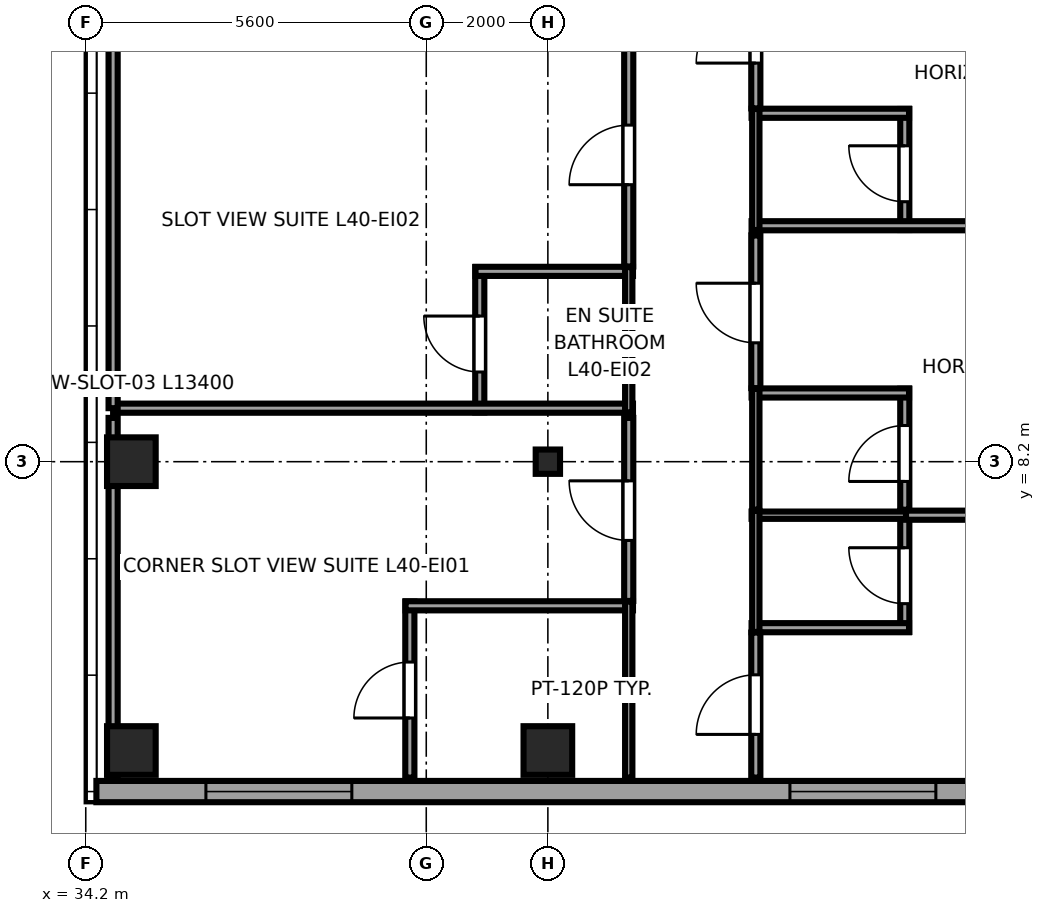
"""IFC4 building model, lengths in metres.
Left out: names, types, materials, properties, quantities, classifications, styles, units other than length and angle.
Written with IfcOpenShell. Run it as: python <this file> out.ifc"""

import sys

from ifc_helpers import new_model, si_unit, direction, frame, frame_2d, origin, origin_2d, place, context, subcontext, project, spatial, rectangle, i_section, extrude, source, transform, mapped, element, fill, save


model = new_model("IFC4")
c1 = context("Model", 3, precision=1e-05, world=origin(), true_north=direction((0.0, 1.0)))
c2 = subcontext(c1, "Body", "Model", "MODEL_VIEW")
j1 = project(units=[si_unit("LENGTHUNIT", "METRE"), si_unit("PLANEANGLEUNIT", "RADIAN")], contexts=[c1])
p1 = place(None, origin())
s1 = spatial("IfcSite", under=j1, at=p1, CompositionType="ELEMENT")
p2 = place(p1, origin())
s2 = spatial("IfcBuilding", under=s1, at=p2, CompositionType="ELEMENT")
p3 = place(p2, frame((0.0, 0.0, 154.15)))
s3 = spatial("IfcBuildingStorey", under=s2, at=p3, CompositionType="ELEMENT", Elevation=154.15)
m1 = source(origin(), c2, "Body", "SweptSolid", [
    extrude(rectangle(XDim=0.8, YDim=0.8, at=origin_2d()), origin(), (0.0, 0.0, 1.0), 3.55),
])
for number, where, z_axis, x_axis in (
    (1, (34.95, 3.45, 0.0), (0.0, 0.0, 1.0), (1.0, 0.0, 0.0)),
    (2, (34.95, 8.2, 0.0), (0.0, 0.0, 1.0), (1.0, 0.0, 0.0)),
    (3, (41.8, 3.45, 0.0), (0.0, 0.0, 1.0), (1.0, 0.0, 0.0)),
):
    element("IfcColumn", number, at=place(p3, frame(where, z_axis=z_axis, x_axis=x_axis)), inside=s3, PredefinedType="COLUMN", context=c2, shape_type="MappedRepresentation", body=[
        mapped(m1, transform((0.0, 0.0, 0.0), x_axis=(1.0, 0.0, 0.0), y_axis=(0.0, 1.0, 0.0), z_axis=(0.0, 0.0, 1.0), scale=1.0)),
    ])
m2 = source(origin(), c2, "Body", "SweptSolid", [
    extrude(i_section(OverallWidth=0.4, OverallDepth=0.4, WebThickness=0.02, FlangeThickness=0.035, at=origin_2d()), origin(), (0.0, 0.0, 1.0), 3.55),
])
p4 = place(p3, frame((41.8, 8.2, 0.0), z_axis=(0.0, 0.0, 1.0), x_axis=(1.0, 0.0, 0.0)))
e4 = element("IfcColumn", 4, at=p4, inside=s3, PredefinedType="COLUMN", context=c2, shape_type="MappedRepresentation", body=[
    mapped(m2, transform((0.0, 0.0, 0.0), x_axis=(1.0, 0.0, 0.0), y_axis=(0.0, 1.0, 0.0), z_axis=(0.0, 0.0, 1.0), scale=1.0)),
])
p5 = place(p3, frame((34.375, 2.775, 0.0), z_axis=(0.0, 0.0, 1.0), x_axis=(1.0, 0.0, 0.0)))
e5 = element("IfcWall", 5, at=p5, inside=s3, PredefinedType="SOLIDWALL", context=c2, shape_type="SweptSolid", body=[
    extrude(rectangle(XDim=15.608, YDim=0.35, at=frame_2d((7.804, 0.0))), origin(), (0.0, 0.0, 1.0), 3.37),
])
p6 = place(p5, frame((1.801, 0.0, 0.68)))
e6 = element("IfcOpeningElement", 6, at=p6, cuts=e5, PredefinedType="OPENING", context=c2, shape_type="SweptSolid", body=[
    extrude(rectangle(XDim=2.4, YDim=1.9, at=frame_2d((1.2, 0.95))), frame((0.0, 0.185, 0.0), z_axis=(0.0, -1.0, 0.0), x_axis=(1.0, 0.0, 0.0)), (0.0, 0.0, 1.0), 0.37),
])
p7 = place(p5, frame((11.406, 0.0, 0.68)))
e7 = element("IfcOpeningElement", 7, at=p7, cuts=e5, PredefinedType="OPENING", context=c2, shape_type="SweptSolid", body=[
    extrude(rectangle(XDim=2.4, YDim=1.9, at=frame_2d((1.2, 0.95))), frame((0.0, 0.185, 0.0), z_axis=(0.0, -1.0, 0.0), x_axis=(1.0, 0.0, 0.0)), (0.0, 0.0, 1.0), 0.37),
])
p8 = place(p3, frame((39.53, 3.005, 0.0), z_axis=(0.0, 0.0, 1.0), x_axis=(0.0, 1.0, 0.0)))
e8 = element("IfcWall", 8, at=p8, inside=s3, PredefinedType="PARTITIONING", context=c2, shape_type="SweptSolid", body=[
    extrude(rectangle(XDim=2.895, YDim=0.15, at=frame_2d((1.448, 0.0))), origin(), (0.0, 0.0, 1.0), 3.37),
])
p9 = place(p8, frame((0.98, 0.0, 0.0)))
e9 = element("IfcOpeningElement", 9, at=p9, cuts=e8, PredefinedType="OPENING", context=c2, shape_type="SweptSolid", body=[
    extrude(rectangle(XDim=0.92, YDim=2.01, at=frame_2d((0.46, 1.005))), frame((0.0, 0.085, 0.0), z_axis=(0.0, -1.0, 0.0), x_axis=(1.0, 0.0, 0.0)), (0.0, 0.0, 1.0), 0.17),
])
p10 = place(p3, frame((39.46, 5.83, 0.0), z_axis=(0.0, 0.0, 1.0), x_axis=(1.0, 0.0, 0.0)))
e10 = element("IfcWall", 10, at=p10, inside=s3, PredefinedType="PARTITIONING", context=c2, shape_type="SweptSolid", body=[
    extrude(rectangle(XDim=3.74, YDim=0.15, at=frame_2d((1.87, 0.0))), origin(), (0.0, 0.0, 1.0), 3.37),
])
p11 = place(p3, frame((43.13, 3.005, 0.0), z_axis=(0.0, 0.0, 1.0), x_axis=(0.0, 1.0, 0.0)))
e11 = element("IfcWall", 11, at=p11, inside=s3, PredefinedType="PLUMBINGWALL", context=c2, shape_type="SweptSolid", body=[
    extrude(rectangle(XDim=2.895, YDim=0.12, at=frame_2d((1.448, 0.0))), origin(), (0.0, 0.0, 1.0), 3.37),
])
p12 = place(p3, frame((40.68, 9.01, 0.0), z_axis=(0.0, 0.0, 1.0), x_axis=(0.0, 1.0, 0.0)))
e12 = element("IfcWall", 12, at=p12, inside=s3, PredefinedType="PARTITIONING", context=c2, shape_type="SweptSolid", body=[
    extrude(rectangle(XDim=2.39, YDim=0.15, at=frame_2d((1.195, 0.0))), origin(), (0.0, 0.0, 1.0), 3.37),
])
p13 = place(p12, frame((0.665, 0.0, 0.0)))
e13 = element("IfcOpeningElement", 13, at=p13, cuts=e12, PredefinedType="OPENING", context=c2, shape_type="SweptSolid", body=[
    extrude(rectangle(XDim=0.92, YDim=2.01, at=frame_2d((0.46, 1.005))), frame((0.0, 0.085, 0.0), z_axis=(0.0, -1.0, 0.0), x_axis=(1.0, 0.0, 0.0)), (0.0, 0.0, 1.0), 0.17),
])
p14 = place(p3, frame((34.65, 9.08, 0.0), z_axis=(0.0, 0.0, 1.0), x_axis=(1.0, 0.0, 0.0)))
e14 = element("IfcWall", 14, at=p14, inside=s3, PredefinedType="PARTITIONING", context=c2, shape_type="SweptSolid", body=[
    extrude(rectangle(XDim=8.55, YDim=0.15, at=frame_2d((4.275, 0.0))), origin(), (0.0, 0.0, 1.0), 3.37),
])
p15 = place(p3, frame((40.61, 11.33, 0.0), z_axis=(0.0, 0.0, 1.0), x_axis=(1.0, 0.0, 0.0)))
e15 = element("IfcWall", 15, at=p15, inside=s3, PredefinedType="PARTITIONING", context=c2, shape_type="SweptSolid", body=[
    extrude(rectangle(XDim=2.59, YDim=0.15, at=frame_2d((1.295, 0.0))), origin(), (0.0, 0.0, 1.0), 3.37),
])
p16 = place(p3, frame((43.13, 9.01, 0.0), z_axis=(0.0, 0.0, 1.0), x_axis=(0.0, 1.0, 0.0)))
e16 = element("IfcWall", 16, at=p16, inside=s3, PredefinedType="PLUMBINGWALL", context=c2, shape_type="SweptSolid", body=[
    extrude(rectangle(XDim=2.39, YDim=0.12, at=frame_2d((1.195, 0.0))), origin(), (0.0, 0.0, 1.0), 3.37),
])
p17 = place(p3, frame((47.67, 5.4, 0.0), z_axis=(0.0, 0.0, 1.0), x_axis=(0.0, 1.0, 0.0)))
e17 = element("IfcWall", 17, at=p17, inside=s3, PredefinedType="PARTITIONING", context=c2, shape_type="SweptSolid", body=[
    extrude(rectangle(XDim=1.99, YDim=0.15, at=frame_2d((0.995, 0.0))), origin(), (0.0, 0.0, 1.0), 3.37),
])
p18 = place(p17, frame((0.465, 0.0, 0.0)))
e18 = element("IfcOpeningElement", 18, at=p18, cuts=e17, PredefinedType="OPENING", context=c2, shape_type="SweptSolid", body=[
    extrude(rectangle(XDim=0.92, YDim=2.01, at=frame_2d((0.46, 1.005))), frame((0.0, 0.085, 0.0), z_axis=(0.0, -1.0, 0.0), x_axis=(1.0, 0.0, 0.0)), (0.0, 0.0, 1.0), 0.17),
])
p19 = place(p3, frame((45.15, 5.47, 0.0), z_axis=(0.0, 0.0, 1.0), x_axis=(1.0, 0.0, 0.0)))
e19 = element("IfcWall", 19, at=p19, inside=s3, PredefinedType="PARTITIONING", context=c2, shape_type="SweptSolid", body=[
    extrude(rectangle(XDim=2.59, YDim=0.15, at=frame_2d((1.295, 0.0))), origin(), (0.0, 0.0, 1.0), 3.37),
])
p20 = place(p3, frame((45.15, 7.32, 0.0), z_axis=(0.0, 0.0, 1.0), x_axis=(1.0, 0.0, 0.0)))
e20 = element("IfcWall", 20, at=p20, inside=s3, PredefinedType="PLUMBINGWALL", context=c2, shape_type="SweptSolid", body=[
    extrude(rectangle(XDim=2.59, YDim=0.12, at=frame_2d((1.295, 0.0))), origin(), (0.0, 0.0, 1.0), 3.37),
])
p21 = place(p3, frame((45.22, 5.4, 0.0), z_axis=(0.0, 0.0, 1.0), x_axis=(0.0, 1.0, 0.0)))
e21 = element("IfcWall", 21, at=p21, inside=s3, PredefinedType="PLUMBINGWALL", context=c2, shape_type="SweptSolid", body=[
    extrude(rectangle(XDim=1.99, YDim=0.12, at=frame_2d((0.995, 0.0))), origin(), (0.0, 0.0, 1.0), 3.37),
])
p22 = place(p3, frame((47.67, 7.41, 0.0), z_axis=(0.0, 0.0, 1.0), x_axis=(0.0, 1.0, 0.0)))
e22 = element("IfcWall", 22, at=p22, inside=s3, PredefinedType="PARTITIONING", context=c2, shape_type="SweptSolid", body=[
    extrude(rectangle(XDim=1.99, YDim=0.15, at=frame_2d((0.995, 0.0))), origin(), (0.0, 0.0, 1.0), 3.37),
])
p23 = place(p22, frame((0.465, 0.0, 0.0)))
e23 = element("IfcOpeningElement", 23, at=p23, cuts=e22, PredefinedType="OPENING", context=c2, shape_type="SweptSolid", body=[
    extrude(rectangle(XDim=0.92, YDim=2.01, at=frame_2d((0.46, 1.005))), frame((0.0, 0.085, 0.0), z_axis=(0.0, -1.0, 0.0), x_axis=(1.0, 0.0, 0.0)), (0.0, 0.0, 1.0), 0.17),
])
p24 = place(p3, frame((45.15, 9.33, 0.0), z_axis=(0.0, 0.0, 1.0), x_axis=(1.0, 0.0, 0.0)))
e24 = element("IfcWall", 24, at=p24, inside=s3, PredefinedType="PARTITIONING", context=c2, shape_type="SweptSolid", body=[
    extrude(rectangle(XDim=2.59, YDim=0.15, at=frame_2d((1.295, 0.0))), origin(), (0.0, 0.0, 1.0), 3.37),
])
p25 = place(p3, frame((45.22, 7.41, 0.0), z_axis=(0.0, 0.0, 1.0), x_axis=(0.0, 1.0, 0.0)))
e25 = element("IfcWall", 25, at=p25, inside=s3, PredefinedType="PLUMBINGWALL", context=c2, shape_type="SweptSolid", body=[
    extrude(rectangle(XDim=1.99, YDim=0.12, at=frame_2d((0.995, 0.0))), origin(), (0.0, 0.0, 1.0), 3.37),
])
p26 = place(p3, frame((47.67, 12.01, 0.0), z_axis=(0.0, 0.0, 1.0), x_axis=(0.0, 1.0, 0.0)))
e26 = element("IfcWall", 26, at=p26, inside=s3, PredefinedType="PARTITIONING", context=c2, shape_type="SweptSolid", body=[
    extrude(rectangle(XDim=1.99, YDim=0.15, at=frame_2d((0.995, 0.0))), origin(), (0.0, 0.0, 1.0), 3.37),
])
p27 = place(p26, frame((0.465, 0.0, 0.0)))
e27 = element("IfcOpeningElement", 27, at=p27, cuts=e26, PredefinedType="OPENING", context=c2, shape_type="SweptSolid", body=[
    extrude(rectangle(XDim=0.92, YDim=2.01, at=frame_2d((0.46, 1.005))), frame((0.0, 0.085, 0.0), z_axis=(0.0, -1.0, 0.0), x_axis=(1.0, 0.0, 0.0)), (0.0, 0.0, 1.0), 0.17),
])
p28 = place(p3, frame((45.15, 12.08, 0.0), z_axis=(0.0, 0.0, 1.0), x_axis=(1.0, 0.0, 0.0)))
e28 = element("IfcWall", 28, at=p28, inside=s3, PredefinedType="PARTITIONING", context=c2, shape_type="SweptSolid", body=[
    extrude(rectangle(XDim=8.845, YDim=0.15, at=frame_2d((4.423, 0.0))), origin(), (0.0, 0.0, 1.0), 3.37),
])
p29 = place(p3, frame((45.15, 13.93, 0.0), z_axis=(0.0, 0.0, 1.0), x_axis=(1.0, 0.0, 0.0)))
e29 = element("IfcWall", 29, at=p29, inside=s3, PredefinedType="PARTITIONING", context=c2, shape_type="SweptSolid", body=[
    extrude(rectangle(XDim=2.59, YDim=0.15, at=frame_2d((1.295, 0.0))), origin(), (0.0, 0.0, 1.0), 3.37),
])
p30 = place(p3, frame((45.22, 12.01, 0.0), z_axis=(0.0, 0.0, 1.0), x_axis=(0.0, 1.0, 0.0)))
e30 = element("IfcWall", 30, at=p30, inside=s3, PredefinedType="PLUMBINGWALL", context=c2, shape_type="SweptSolid", body=[
    extrude(rectangle(XDim=1.99, YDim=0.12, at=frame_2d((0.995, 0.0))), origin(), (0.0, 0.0, 1.0), 3.37),
])
p31 = place(p3, frame((43.13, 5.91, 0.0), z_axis=(0.0, 0.0, 1.0), x_axis=(0.0, 1.0, 0.0)))
e31 = element("IfcWall", 31, at=p31, inside=s3, PredefinedType="PARTITIONING", context=c2, shape_type="SweptSolid", body=[
    extrude(rectangle(XDim=3.01, YDim=0.15, at=frame_2d((1.505, 0.0))), origin(), (0.0, 0.0, 1.0), 3.37),
])
p32 = place(p31, frame((0.995, 0.0, 0.0)))
e32 = element("IfcOpeningElement", 32, at=p32, cuts=e31, PredefinedType="OPENING", context=c2, shape_type="SweptSolid", body=[
    extrude(rectangle(XDim=0.98, YDim=2.12, at=frame_2d((0.49, 1.06))), frame((0.0, 0.085, 0.0), z_axis=(0.0, -1.0, 0.0), x_axis=(1.0, 0.0, 0.0)), (0.0, 0.0, 1.0), 0.17),
])
p33 = place(p3, frame((34.65, 3.005, 0.0), z_axis=(0.0, 0.0, 1.0), x_axis=(0.0, 1.0, 0.0)))
e33 = element("IfcWall", 33, at=p33, inside=s3, PredefinedType="PARTITIONING", context=c2, shape_type="SweptSolid", body=[
    extrude(rectangle(XDim=5.915, YDim=0.15, at=frame_2d((2.958, 0.0))), origin(), (0.0, 0.0, 1.0), 3.37),
])
p34 = place(p3, frame((43.13, 11.41, 0.0), z_axis=(0.0, 0.0, 1.0), x_axis=(0.0, 1.0, 0.0)))
e34 = element("IfcWall", 34, at=p34, inside=s3, PredefinedType="PARTITIONING", context=c2, shape_type="SweptSolid", body=[
    extrude(rectangle(XDim=3.71, YDim=0.15, at=frame_2d((1.855, 0.0))), origin(), (0.0, 0.0, 1.0), 3.37),
])
p35 = place(p34, frame((1.345, 0.0, 0.0)))
e35 = element("IfcOpeningElement", 35, at=p35, cuts=e34, PredefinedType="OPENING", context=c2, shape_type="SweptSolid", body=[
    extrude(rectangle(XDim=0.98, YDim=2.12, at=frame_2d((0.49, 1.06))), frame((0.0, 0.085, 0.0), z_axis=(0.0, -1.0, 0.0), x_axis=(1.0, 0.0, 0.0)), (0.0, 0.0, 1.0), 0.17),
])
p36 = place(p3, frame((34.65, 9.08, 0.0), z_axis=(0.0, 0.0, 1.0), x_axis=(0.0, 1.0, 0.0)))
e36 = element("IfcWall", 36, at=p36, inside=s3, PredefinedType="PARTITIONING", context=c2, shape_type="SweptSolid", body=[
    extrude(rectangle(XDim=6.04, YDim=0.15, at=frame_2d((3.02, 0.0))), origin(), (0.0, 0.0, 1.0), 3.37),
])
p37 = place(p3, frame((45.22, 3.005, 0.0), z_axis=(0.0, 0.0, 1.0), x_axis=(0.0, 1.0, 0.0)))
e37 = element("IfcWall", 37, at=p37, inside=s3, PredefinedType="PARTITIONING", context=c2, shape_type="SweptSolid", body=[
    extrude(rectangle(XDim=2.385, YDim=0.15, at=frame_2d((1.192, 0.0))), origin(), (0.0, 0.0, 1.0), 3.37),
])
p38 = place(p37, frame((0.71, 0.0, 0.0)))
e38 = element("IfcOpeningElement", 38, at=p38, cuts=e37, PredefinedType="OPENING", context=c2, shape_type="SweptSolid", body=[
    extrude(rectangle(XDim=0.98, YDim=2.12, at=frame_2d((0.49, 1.06))), frame((0.0, 0.085, 0.0), z_axis=(0.0, -1.0, 0.0), x_axis=(1.0, 0.0, 0.0)), (0.0, 0.0, 1.0), 0.17),
])
p39 = place(p3, frame((47.69, 7.32, 0.0), z_axis=(0.0, 0.0, 1.0), x_axis=(1.0, 0.0, 0.0)))
e39 = element("IfcWall", 39, at=p39, inside=s3, PredefinedType="PARTITIONING", context=c2, shape_type="SweptSolid", body=[
    extrude(rectangle(XDim=6.305, YDim=0.15, at=frame_2d((3.153, 0.0))), origin(), (0.0, 0.0, 1.0), 3.37),
])
p40 = place(p3, frame((45.22, 9.41, 0.0), z_axis=(0.0, 0.0, 1.0), x_axis=(0.0, 1.0, 0.0)))
e40 = element("IfcWall", 40, at=p40, inside=s3, PredefinedType="PARTITIONING", context=c2, shape_type="SweptSolid", body=[
    extrude(rectangle(XDim=2.51, YDim=0.15, at=frame_2d((1.255, 0.0))), origin(), (0.0, 0.0, 1.0), 3.37),
])
p41 = place(p40, frame((0.745, 0.0, 0.0)))
e41 = element("IfcOpeningElement", 41, at=p41, cuts=e40, PredefinedType="OPENING", context=c2, shape_type="SweptSolid", body=[
    extrude(rectangle(XDim=0.98, YDim=2.12, at=frame_2d((0.49, 1.06))), frame((0.0, 0.085, 0.0), z_axis=(0.0, -1.0, 0.0), x_axis=(1.0, 0.0, 0.0)), (0.0, 0.0, 1.0), 0.17),
])
p42 = place(p3, frame((45.22, 14.01, 0.0), z_axis=(0.0, 0.0, 1.0), x_axis=(0.0, 1.0, 0.0)))
e42 = element("IfcWall", 42, at=p42, inside=s3, PredefinedType="PARTITIONING", context=c2, shape_type="SweptSolid", body=[
    extrude(rectangle(XDim=2.51, YDim=0.15, at=frame_2d((1.255, 0.0))), origin(), (0.0, 0.0, 1.0), 3.37),
])
p43 = place(p42, frame((0.745, 0.0, 0.0)))
e43 = element("IfcOpeningElement", 43, at=p43, cuts=e42, PredefinedType="OPENING", context=c2, shape_type="SweptSolid", body=[
    extrude(rectangle(XDim=0.98, YDim=2.12, at=frame_2d((0.49, 1.06))), frame((0.0, 0.085, 0.0), z_axis=(0.0, -1.0, 0.0), x_axis=(1.0, 0.0, 0.0)), (0.0, 0.0, 1.0), 0.17),
])
m3 = source(origin(), c2, "Body", "SweptSolid", [
    extrude(rectangle(XDim=2.4, YDim=1.9, at=frame_2d((1.2, 0.95))), frame((0.0, 0.09, 0.0), z_axis=(0.0, -1.0, 0.0), x_axis=(1.0, 0.0, 0.0)), (0.0, 0.0, 1.0), 0.06),
])
p44 = place(p6, origin())
e44 = element("IfcWindow", 44, at=p44, inside=s3, PartitioningType="TRIPLE_PANEL_HORIZONTAL", PredefinedType="WINDOW", context=c2, shape_type="MappedRepresentation", body=[
    mapped(m3, transform((0.0, 0.0, 0.0), x_axis=(1.0, 0.0, 0.0), y_axis=(0.0, 1.0, 0.0), z_axis=(0.0, 0.0, 1.0), scale=1.0)),
])
fill(e6, e44)
p45 = place(p7, origin())
e45 = element("IfcWindow", 45, at=p45, inside=s3, PartitioningType="TRIPLE_PANEL_HORIZONTAL", PredefinedType="WINDOW", context=c2, shape_type="MappedRepresentation", body=[
    mapped(m3, transform((0.0, 0.0, 0.0), x_axis=(1.0, 0.0, 0.0), y_axis=(0.0, 1.0, 0.0), z_axis=(0.0, 0.0, 1.0), scale=1.0)),
])
fill(e7, e45)
m4 = source(origin(), c2, "Body", "SweptSolid", [
    extrude(rectangle(XDim=0.92, YDim=2.01, at=frame_2d((0.46, 1.005))), frame((0.0, 0.025, 0.0), z_axis=(0.0, -1.0, 0.0), x_axis=(1.0, 0.0, 0.0)), (0.0, 0.0, 1.0), 0.05),
])
p46 = place(p9, origin())
e46 = element("IfcDoor", 46, at=p46, inside=s3, OperationType="SINGLE_SWING_LEFT", PredefinedType="DOOR", context=c2, shape_type="MappedRepresentation", body=[
    mapped(m4, transform((0.0, 0.0, 0.0), x_axis=(1.0, 0.0, 0.0), y_axis=(0.0, 1.0, 0.0), z_axis=(0.0, 0.0, 1.0), scale=1.0)),
])
fill(e9, e46)
p47 = place(p13, origin())
e47 = element("IfcDoor", 47, at=p47, inside=s3, OperationType="SINGLE_SWING_RIGHT", PredefinedType="DOOR", context=c2, shape_type="MappedRepresentation", body=[
    mapped(m4, transform((0.0, 0.0, 0.0), x_axis=(1.0, 0.0, 0.0), y_axis=(0.0, 1.0, 0.0), z_axis=(0.0, 0.0, 1.0), scale=1.0)),
])
fill(e13, e47)
p48 = place(p18, origin())
e48 = element("IfcDoor", 48, at=p48, inside=s3, OperationType="SINGLE_SWING_RIGHT", PredefinedType="DOOR", context=c2, shape_type="MappedRepresentation", body=[
    mapped(m4, transform((0.0, 0.0, 0.0), x_axis=(1.0, 0.0, 0.0), y_axis=(0.0, 1.0, 0.0), z_axis=(0.0, 0.0, 1.0), scale=1.0)),
])
fill(e18, e48)
p49 = place(p23, origin())
e49 = element("IfcDoor", 49, at=p49, inside=s3, OperationType="SINGLE_SWING_LEFT", PredefinedType="DOOR", context=c2, shape_type="MappedRepresentation", body=[
    mapped(m4, transform((0.0, 0.0, 0.0), x_axis=(1.0, 0.0, 0.0), y_axis=(0.0, 1.0, 0.0), z_axis=(0.0, 0.0, 1.0), scale=1.0)),
])
fill(e23, e49)
p50 = place(p27, origin())
e50 = element("IfcDoor", 50, at=p50, inside=s3, OperationType="SINGLE_SWING_RIGHT", PredefinedType="DOOR", context=c2, shape_type="MappedRepresentation", body=[
    mapped(m4, transform((0.0, 0.0, 0.0), x_axis=(1.0, 0.0, 0.0), y_axis=(0.0, 1.0, 0.0), z_axis=(0.0, 0.0, 1.0), scale=1.0)),
])
fill(e27, e50)
m5 = source(origin(), c2, "Body", "SweptSolid", [
    extrude(rectangle(XDim=0.98, YDim=2.12, at=frame_2d((0.49, 1.06))), frame((0.0, 0.025, 0.0), z_axis=(0.0, -1.0, 0.0), x_axis=(1.0, 0.0, 0.0)), (0.0, 0.0, 1.0), 0.05),
])
p51 = place(p32, origin())
e51 = element("IfcDoor", 51, at=p51, inside=s3, OperationType="SINGLE_SWING_RIGHT", PredefinedType="DOOR", context=c2, shape_type="MappedRepresentation", body=[
    mapped(m5, transform((0.0, 0.0, 0.0), x_axis=(1.0, 0.0, 0.0), y_axis=(0.0, 1.0, 0.0), z_axis=(0.0, 0.0, 1.0), scale=1.0)),
])
fill(e32, e51)
p52 = place(p35, origin())
e52 = element("IfcDoor", 52, at=p52, inside=s3, OperationType="SINGLE_SWING_LEFT", PredefinedType="DOOR", context=c2, shape_type="MappedRepresentation", body=[
    mapped(m5, transform((0.0, 0.0, 0.0), x_axis=(1.0, 0.0, 0.0), y_axis=(0.0, 1.0, 0.0), z_axis=(0.0, 0.0, 1.0), scale=1.0)),
])
fill(e35, e52)
p53 = place(p38, origin())
e53 = element("IfcDoor", 53, at=p53, inside=s3, OperationType="SINGLE_SWING_LEFT", PredefinedType="DOOR", context=c2, shape_type="MappedRepresentation", body=[
    mapped(m5, transform((0.0, 0.0, 0.0), x_axis=(1.0, 0.0, 0.0), y_axis=(0.0, 1.0, 0.0), z_axis=(0.0, 0.0, 1.0), scale=1.0)),
])
fill(e38, e53)
p54 = place(p41, origin())
e54 = element("IfcDoor", 54, at=p54, inside=s3, OperationType="SINGLE_SWING_RIGHT", PredefinedType="DOOR", context=c2, shape_type="MappedRepresentation", body=[
    mapped(m5, transform((0.0, 0.0, 0.0), x_axis=(1.0, 0.0, 0.0), y_axis=(0.0, 1.0, 0.0), z_axis=(0.0, 0.0, 1.0), scale=1.0)),
])
fill(e41, e54)
p55 = place(p43, origin())
e55 = element("IfcDoor", 55, at=p55, inside=s3, OperationType="SINGLE_SWING_LEFT", PredefinedType="DOOR", context=c2, shape_type="MappedRepresentation", body=[
    mapped(m5, transform((0.0, 0.0, 0.0), x_axis=(1.0, 0.0, 0.0), y_axis=(0.0, 1.0, 0.0), z_axis=(0.0, 0.0, 1.0), scale=1.0)),
])
fill(e43, e55)
save(model, sys.argv[1])
